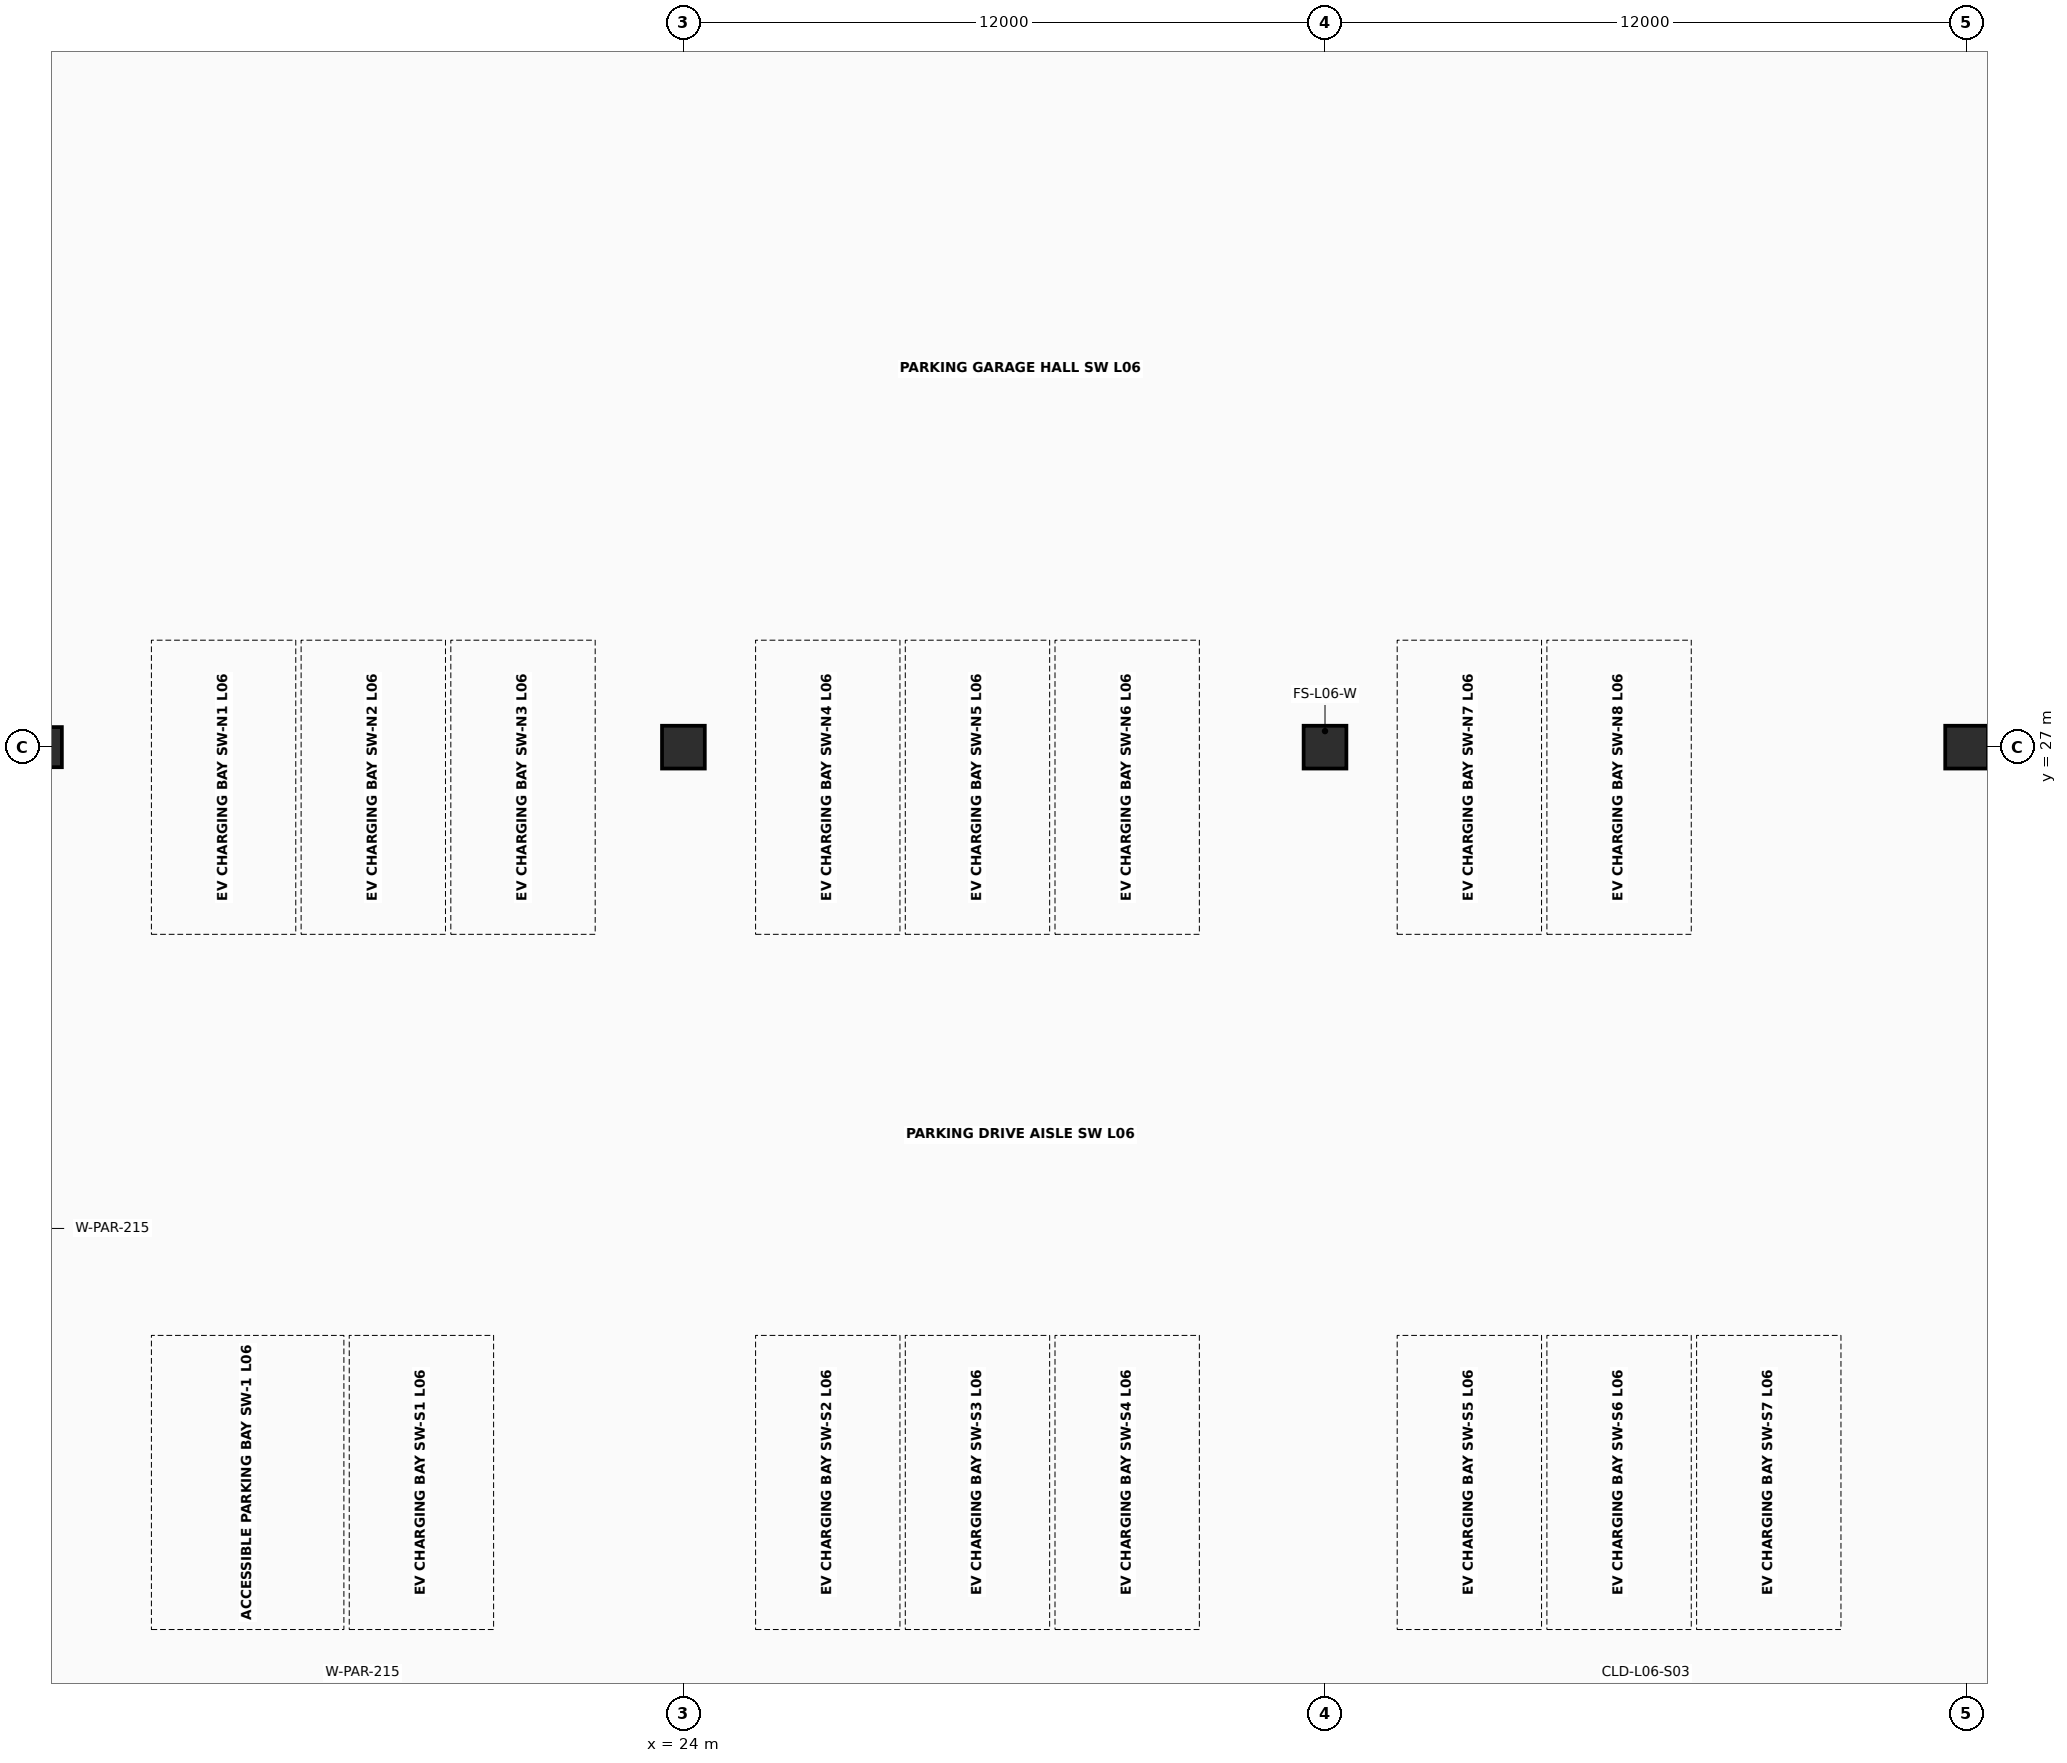
"""IFC4 building model, lengths in metres.
Left out: names, types, materials, properties, quantities, classifications, styles, units other than length and angle.
Written with IfcOpenShell. Run it as: python <this file> out.ifc"""

import sys

from ifc_helpers import new_model, si_unit, direction, frame, origin, origin_2d, place, context, subcontext, project, spatial, rectangle, extrude, element, save


model = new_model("IFC4")
c1 = context("Model", 3, precision=1e-05, world=origin(), true_north=direction((0.0, 1.0)))
c2 = subcontext(c1, "Body", "Model", "MODEL_VIEW")
j1 = project(units=[si_unit("LENGTHUNIT", "METRE"), si_unit("PLANEANGLEUNIT", "RADIAN")], contexts=[c1])
p1 = place(None, origin())
s1 = spatial("IfcSite", under=j1, at=p1, CompositionType="ELEMENT")
p2 = place(p1, origin())
s2 = spatial("IfcBuilding", under=s1, at=p2, CompositionType="ELEMENT")
p3 = place(p2, frame((0.0, 0.0, 24.8)))
s3 = spatial("IfcBuildingStorey", under=s2, at=p3, CompositionType="ELEMENT", Elevation=24.8)
p4 = place(p3, frame((12.0, 27.0, 0.0), z_axis=(0.0, 0.0, 1.0), x_axis=(1.0, 0.0, 0.0)))
e1 = element("IfcColumn", 1, at=p4, inside=s3, PredefinedType="COLUMN", context=c2, shape_type="SweptSolid", body=[
    extrude(rectangle(XDim=0.75, YDim=0.75, at=origin_2d()), origin(), (0.0, 0.0, 1.0), 3.8),
])
for number, where, z_axis, x_axis in (
    (2, (24.0, 27.0, 0.0), (0.0, 0.0, 1.0), (1.0, 0.0, 0.0)),
    (3, (36.0, 27.0, 0.0), (0.0, 0.0, 1.0), (1.0, 0.0, 0.0)),
    (4, (48.0, 27.0, 0.0), (0.0, 0.0, 1.0), (1.0, 0.0, 0.0)),
):
    element("IfcColumn", number, at=place(p3, frame(where, z_axis=z_axis, x_axis=x_axis)), inside=s3, PredefinedType="COLUMN", context=c2, shape_type="SweptSolid", body=[
        extrude(rectangle(XDim=0.8, YDim=0.8, at=origin_2d()), origin(), (0.0, 0.0, 1.0), 3.8),
    ])
save(model, sys.argv[1])
